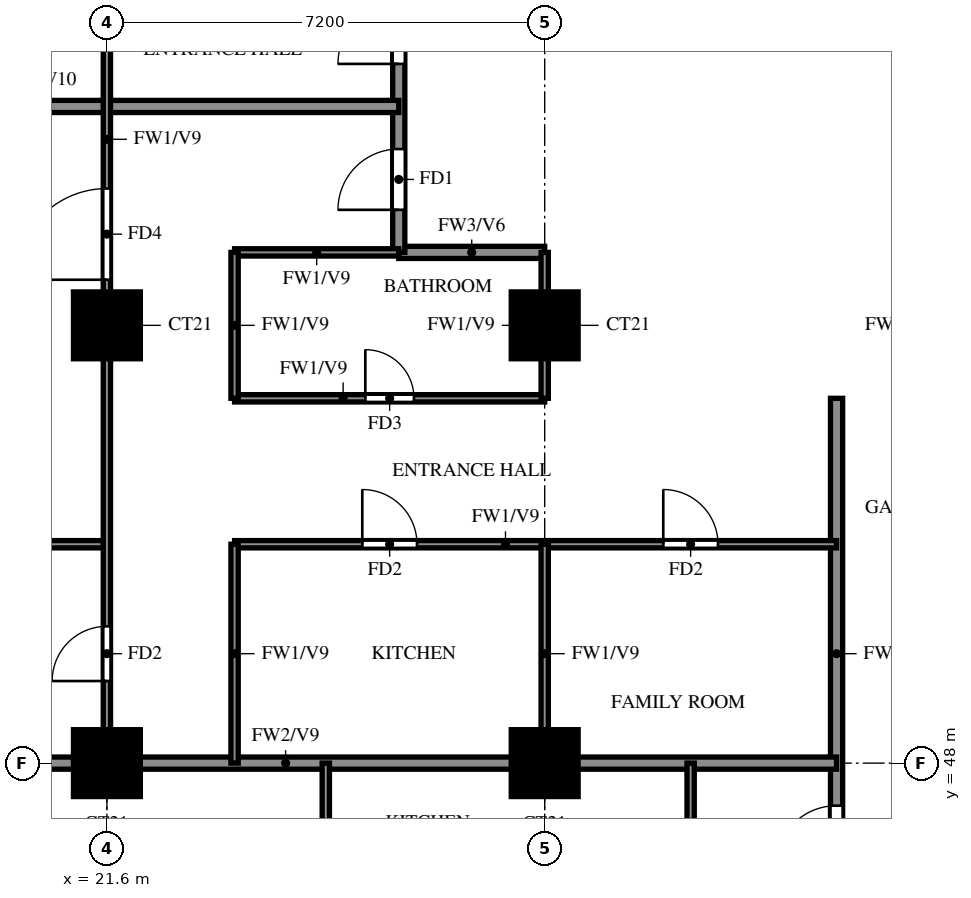
"""IFC4 building model, lengths in metres.
Left out: names, types, materials, properties, quantities, classifications, styles, units other than length and angle.
Written with IfcOpenShell. Run it as: python <this file> out.ifc"""

import sys

from ifc_helpers import new_model, si_unit, direction, frame, frame_2d, origin, origin_2d, place, context, subcontext, project, spatial, rectangle, extrude, source, transform, mapped, element, fill, save


model = new_model("IFC4")
c1 = context("Model", 3, precision=1e-05, world=origin(), true_north=direction((0.0, 1.0)))
c2 = subcontext(c1, "Body", "Model", "MODEL_VIEW")
j1 = project(units=[si_unit("LENGTHUNIT", "METRE"), si_unit("PLANEANGLEUNIT", "RADIAN")], contexts=[c1])
p1 = place(None, origin())
s1 = spatial("IfcSite", under=j1, at=p1, CompositionType="ELEMENT")
p2 = place(p1, origin())
s2 = spatial("IfcBuilding", under=s1, at=p2, CompositionType="ELEMENT")
p3 = place(p2, frame((0.0, 0.0, 134.0)))
s3 = spatial("IfcBuildingStorey", under=s2, at=p3, CompositionType="ELEMENT", Elevation=134.0)
m1 = source(origin(), c2, "Body", "SweptSolid", [
    extrude(rectangle(XDim=1.1, YDim=1.1, at=origin_2d()), origin(), (0.0, 0.0, 1.0), 3.15),
])
for number, where, z_axis, x_axis in (
    (1, (21.6, 48.0, 0.0), (0.0, 0.0, 1.0), (1.0, 0.0, 0.0)),
    (2, (28.8, 48.0, 0.0), (0.0, 0.0, 1.0), (1.0, 0.0, 0.0)),
    (3, (21.6, 55.2, 0.0), (0.0, 0.0, 1.0), (1.0, 0.0, 0.0)),
    (4, (28.8, 55.2, 0.0), (0.0, 0.0, 1.0), (1.0, 0.0, 0.0)),
):
    element("IfcColumn", number, at=place(p3, frame(where, z_axis=z_axis, x_axis=x_axis)), inside=s3, PredefinedType="COLUMN", context=c2, shape_type="MappedRepresentation", body=[
        mapped(m1, transform((0.0, 0.0, 0.0))),
    ])
p4 = place(p3, frame((26.4, 56.4, 0.0), z_axis=(0.0, 0.0, 1.0), x_axis=(1.0, 0.0, 0.0)))
e5 = element("IfcWall", 5, at=p4, inside=s3, PredefinedType="SOLIDWALL", context=c2, shape_type="SweptSolid", body=[
    extrude(rectangle(XDim=2.4, YDim=0.2, at=frame_2d((1.2, 0.0))), origin(), (0.0, 0.0, 1.0), 3.15),
])
p5 = place(p3, frame((26.4, 56.4, 0.0), z_axis=(0.0, 0.0, 1.0), x_axis=(0.0, 1.0, 0.0)))
e6 = element("IfcWall", 6, at=p5, inside=s3, PredefinedType="SOLIDWALL", context=c2, shape_type="SweptSolid", body=[
    extrude(rectangle(XDim=9.6, YDim=0.2, at=frame_2d((4.8, 0.0))), origin(), (0.0, 0.0, 1.0), 3.15),
])
p6 = place(p5, frame((0.7, 0.0, 0.0)))
e7 = element("IfcOpeningElement", 7, at=p6, cuts=e6, PredefinedType="OPENING", context=c2, shape_type="SweptSolid", body=[
    extrude(rectangle(XDim=1.0, YDim=2.1, at=frame_2d((0.5, 1.05))), frame((0.0, 0.11, 0.0), z_axis=(0.0, -1.0, 0.0), x_axis=(1.0, 0.0, 0.0)), (0.0, 0.0, 1.0), 0.22),
])
p7 = place(p5, frame((3.1, 0.0, 0.0)))
e8 = element("IfcOpeningElement", 8, at=p7, cuts=e6, PredefinedType="OPENING", context=c2, shape_type="SweptSolid", body=[
    extrude(rectangle(XDim=1.0, YDim=2.1, at=frame_2d((0.5, 1.05))), frame((0.0, 0.11, 0.0), z_axis=(0.0, -1.0, 0.0), x_axis=(1.0, 0.0, 0.0)), (0.0, 0.0, 1.0), 0.22),
])
p8 = place(p3, frame((33.6, 45.6, 0.0), z_axis=(0.0, 0.0, 1.0), x_axis=(0.0, 1.0, 0.0)))
e9 = element("IfcWall", 9, at=p8, inside=s3, PredefinedType="SOLIDWALL", context=c2, shape_type="SweptSolid", body=[
    extrude(rectangle(XDim=8.4, YDim=0.2, at=frame_2d((4.2, 0.0))), origin(), (0.0, 0.0, 1.0), 3.15),
])
p9 = place(p8, frame((0.7, 0.0, 0.0)))
e10 = element("IfcOpeningElement", 10, at=p9, cuts=e9, PredefinedType="OPENING", context=c2, shape_type="SweptSolid", body=[
    extrude(rectangle(XDim=1.0, YDim=2.1, at=frame_2d((0.5, 1.05))), frame((0.0, 0.11, 0.0), z_axis=(0.0, -1.0, 0.0), x_axis=(1.0, 0.0, 0.0)), (0.0, 0.0, 1.0), 0.22),
])
p10 = place(p3, frame((14.525, 48.0, 0.0), z_axis=(0.0, 0.0, 1.0), x_axis=(1.0, 0.0, 0.0)))
e11 = element("IfcWall", 11, at=p10, inside=s3, PredefinedType="SOLIDWALL", context=c2, shape_type="SweptSolid", body=[
    extrude(rectangle(XDim=19.075, YDim=0.2, at=frame_2d((9.538, 0.0))), origin(), (0.0, 0.0, 1.0), 3.15),
])
p11 = place(p3, frame((14.525, 58.8, 0.0), z_axis=(0.0, 0.0, 1.0), x_axis=(1.0, 0.0, 0.0)))
e12 = element("IfcWall", 12, at=p11, inside=s3, PredefinedType="SOLIDWALL", context=c2, shape_type="SweptSolid", body=[
    extrude(rectangle(XDim=11.875, YDim=0.2, at=frame_2d((5.938, 0.0))), origin(), (0.0, 0.0, 1.0), 2.25),
])
p12 = place(p3, frame((14.525, 51.6, 0.0), z_axis=(0.0, 0.0, 1.0), x_axis=(1.0, 0.0, 0.0)))
e13 = element("IfcWall", 13, at=p12, inside=s3, PredefinedType="PARTITIONING", context=c2, shape_type="SweptSolid", body=[
    extrude(rectangle(XDim=7.075, YDim=0.12, at=frame_2d((3.538, 0.0))), origin(), (0.0, 0.0, 1.0), 2.25),
])
p13 = place(p3, frame((23.7, 51.6, 0.0), z_axis=(0.0, 0.0, 1.0), x_axis=(1.0, 0.0, 0.0)))
e14 = element("IfcWall", 14, at=p13, inside=s3, PredefinedType="PARTITIONING", context=c2, shape_type="SweptSolid", body=[
    extrude(rectangle(XDim=9.9, YDim=0.12, at=frame_2d((4.95, 0.0))), origin(), (0.0, 0.0, 1.0), 3.15),
])
p14 = place(p13, frame((2.1, 0.0, 0.0)))
e15 = element("IfcOpeningElement", 15, at=p14, cuts=e14, PredefinedType="OPENING", context=c2, shape_type="SweptSolid", body=[
    extrude(rectangle(XDim=0.9, YDim=2.1, at=frame_2d((0.45, 1.05))), frame((0.0, 0.07, 0.0), z_axis=(0.0, -1.0, 0.0), x_axis=(1.0, 0.0, 0.0)), (0.0, 0.0, 1.0), 0.14),
])
p15 = place(p13, frame((7.05, 0.0, 0.0)))
e16 = element("IfcOpeningElement", 16, at=p15, cuts=e14, PredefinedType="OPENING", context=c2, shape_type="SweptSolid", body=[
    extrude(rectangle(XDim=0.9, YDim=2.1, at=frame_2d((0.45, 1.05))), frame((0.0, 0.07, 0.0), z_axis=(0.0, -1.0, 0.0), x_axis=(1.0, 0.0, 0.0)), (0.0, 0.0, 1.0), 0.14),
])
p16 = place(p3, frame((23.7, 54.0, 0.0), z_axis=(0.0, 0.0, 1.0), x_axis=(1.0, 0.0, 0.0)))
e17 = element("IfcWall", 17, at=p16, inside=s3, PredefinedType="PARTITIONING", context=c2, shape_type="SweptSolid", body=[
    extrude(rectangle(XDim=5.1, YDim=0.12, at=frame_2d((2.55, 0.0))), origin(), (0.0, 0.0, 1.0), 3.15),
])
p17 = place(p16, frame((2.15, 0.0, 0.0)))
e18 = element("IfcOpeningElement", 18, at=p17, cuts=e17, PredefinedType="OPENING", context=c2, shape_type="SweptSolid", body=[
    extrude(rectangle(XDim=0.8, YDim=2.1, at=frame_2d((0.4, 1.05))), frame((0.0, 0.07, 0.0), z_axis=(0.0, -1.0, 0.0), x_axis=(1.0, 0.0, 0.0)), (0.0, 0.0, 1.0), 0.14),
])
p18 = place(p3, frame((23.7, 56.4, 0.0), z_axis=(0.0, 0.0, 1.0), x_axis=(1.0, 0.0, 0.0)))
e19 = element("IfcWall", 19, at=p18, inside=s3, PredefinedType="PARTITIONING", context=c2, shape_type="SweptSolid", body=[
    extrude(rectangle(XDim=2.7, YDim=0.12, at=frame_2d((1.35, 0.0))), origin(), (0.0, 0.0, 1.0), 3.15),
])
p19 = place(p3, frame((21.6, 48.0, 0.0), z_axis=(0.0, 0.0, 1.0), x_axis=(0.0, 1.0, 0.0)))
e20 = element("IfcWall", 20, at=p19, inside=s3, PredefinedType="PARTITIONING", context=c2, shape_type="SweptSolid", body=[
    extrude(rectangle(XDim=21.6, YDim=0.12, at=frame_2d((10.8, 0.0))), origin(), (0.0, 0.0, 1.0), 3.15),
])
p20 = place(p19, frame((1.35, 0.0, 0.0)))
e21 = element("IfcOpeningElement", 21, at=p20, cuts=e20, PredefinedType="OPENING", context=c2, shape_type="SweptSolid", body=[
    extrude(rectangle(XDim=0.9, YDim=2.1, at=frame_2d((0.45, 1.05))), frame((0.0, 0.07, 0.0), z_axis=(0.0, -1.0, 0.0), x_axis=(1.0, 0.0, 0.0)), (0.0, 0.0, 1.0), 0.14),
])
p21 = place(p19, frame((7.95, 0.0, 0.0)))
e22 = element("IfcOpeningElement", 22, at=p21, cuts=e20, PredefinedType="OPENING", context=c2, shape_type="SweptSolid", body=[
    extrude(rectangle(XDim=1.5, YDim=2.1, at=frame_2d((0.75, 1.05))), frame((0.0, 0.07, 0.0), z_axis=(0.0, -1.0, 0.0), x_axis=(1.0, 0.0, 0.0)), (0.0, 0.0, 1.0), 0.14),
])
p22 = place(p19, frame((12.15, 0.0, 0.0)))
e23 = element("IfcOpeningElement", 23, at=p22, cuts=e20, PredefinedType="OPENING", context=c2, shape_type="SweptSolid", body=[
    extrude(rectangle(XDim=0.9, YDim=2.1, at=frame_2d((0.45, 1.05))), frame((0.0, 0.07, 0.0), z_axis=(0.0, -1.0, 0.0), x_axis=(1.0, 0.0, 0.0)), (0.0, 0.0, 1.0), 0.14),
])
p23 = place(p19, frame((17.55, 0.0, 0.0)))
e24 = element("IfcOpeningElement", 24, at=p23, cuts=e20, PredefinedType="OPENING", context=c2, shape_type="SweptSolid", body=[
    extrude(rectangle(XDim=0.9, YDim=2.1, at=frame_2d((0.45, 1.05))), frame((0.0, 0.07, 0.0), z_axis=(0.0, -1.0, 0.0), x_axis=(1.0, 0.0, 0.0)), (0.0, 0.0, 1.0), 0.14),
])
p24 = place(p3, frame((23.7, 48.0, 0.0), z_axis=(0.0, 0.0, 1.0), x_axis=(0.0, 1.0, 0.0)))
e25 = element("IfcWall", 25, at=p24, inside=s3, PredefinedType="PARTITIONING", context=c2, shape_type="SweptSolid", body=[
    extrude(rectangle(XDim=3.6, YDim=0.12, at=frame_2d((1.8, 0.0))), origin(), (0.0, 0.0, 1.0), 3.15),
])
p25 = place(p3, frame((23.7, 54.0, 0.0), z_axis=(0.0, 0.0, 1.0), x_axis=(0.0, 1.0, 0.0)))
e26 = element("IfcWall", 26, at=p25, inside=s3, PredefinedType="PARTITIONING", context=c2, shape_type="SweptSolid", body=[
    extrude(rectangle(XDim=2.4, YDim=0.12, at=frame_2d((1.2, 0.0))), origin(), (0.0, 0.0, 1.0), 3.15),
])
p26 = place(p3, frame((25.2, 39.725, 0.0), z_axis=(0.0, 0.0, 1.0), x_axis=(0.0, 1.0, 0.0)))
e27 = element("IfcWall", 27, at=p26, inside=s3, PredefinedType="PARTITIONING", context=c2, shape_type="SweptSolid", body=[
    extrude(rectangle(XDim=8.275, YDim=0.12, at=frame_2d((4.137, 0.0))), origin(), (0.0, 0.0, 1.0), 3.15),
])
p27 = place(p26, frame((4.525, 0.0, 0.0)))
e28 = element("IfcOpeningElement", 28, at=p27, cuts=e27, PredefinedType="OPENING", context=c2, shape_type="SweptSolid", body=[
    extrude(rectangle(XDim=0.9, YDim=2.1, at=frame_2d((0.45, 1.05))), frame((0.0, 0.07, 0.0), z_axis=(0.0, -1.0, 0.0), x_axis=(1.0, 0.0, 0.0)), (0.0, 0.0, 1.0), 0.14),
])
p28 = place(p3, frame((28.8, 48.0, 0.0), z_axis=(0.0, 0.0, 1.0), x_axis=(0.0, 1.0, 0.0)))
e29 = element("IfcWall", 29, at=p28, inside=s3, PredefinedType="PARTITIONING", context=c2, shape_type="SweptSolid", body=[
    extrude(rectangle(XDim=3.6, YDim=0.12, at=frame_2d((1.8, 0.0))), origin(), (0.0, 0.0, 1.0), 3.15),
])
for number, where, z_axis, x_axis in (
    (30, (28.8, 54.0, 0.0), (0.0, 0.0, 1.0), (0.0, 1.0, 0.0)),
    (31, (31.2, 45.6, 0.0), (0.0, 0.0, 1.0), (0.0, 1.0, 0.0)),
):
    element("IfcWall", number, at=place(p3, frame(where, z_axis=z_axis, x_axis=x_axis)), inside=s3, PredefinedType="PARTITIONING", context=c2, shape_type="SweptSolid", body=[
        extrude(rectangle(XDim=2.4, YDim=0.12, at=frame_2d((1.2, 0.0))), origin(), (0.0, 0.0, 1.0), 3.15),
    ])
p29 = place(p9, origin())
e32 = element("IfcDoor", 32, at=p29, inside=s3, OperationType="SINGLE_SWING_LEFT", PredefinedType="DOOR", context=c2, shape_type="SweptSolid", body=[
    extrude(rectangle(XDim=1.0, YDim=2.1, at=frame_2d((0.5, 1.05))), frame((0.0, 0.025, 0.0), z_axis=(0.0, -1.0, 0.0), x_axis=(1.0, 0.0, 0.0)), (0.0, 0.0, 1.0), 0.05),
])
fill(e10, e32)
p30 = place(p6, origin())
e33 = element("IfcDoor", 33, at=p30, inside=s3, OperationType="SINGLE_SWING_LEFT", PredefinedType="DOOR", context=c2, shape_type="SweptSolid", body=[
    extrude(rectangle(XDim=1.0, YDim=2.1, at=frame_2d((0.5, 1.05))), frame((0.0, 0.025, 0.0), z_axis=(0.0, -1.0, 0.0), x_axis=(1.0, 0.0, 0.0)), (0.0, 0.0, 1.0), 0.05),
])
fill(e7, e33)
p31 = place(p20, origin())
e34 = element("IfcDoor", 34, at=p31, inside=s3, OperationType="SINGLE_SWING_RIGHT", PredefinedType="DOOR", context=c2, shape_type="SweptSolid", body=[
    extrude(rectangle(XDim=0.9, YDim=2.1, at=frame_2d((0.45, 1.05))), frame((0.0, 0.025, 0.0), z_axis=(0.0, -1.0, 0.0), x_axis=(1.0, 0.0, 0.0)), (0.0, 0.0, 1.0), 0.05),
])
fill(e21, e34)
p32 = place(p21, origin())
e35 = element("IfcDoor", 35, at=p32, inside=s3, OperationType="SINGLE_SWING_RIGHT", PredefinedType="DOOR", context=c2, shape_type="SweptSolid", body=[
    extrude(rectangle(XDim=1.5, YDim=2.1, at=frame_2d((0.75, 1.05))), frame((0.0, 0.025, 0.0), z_axis=(0.0, -1.0, 0.0), x_axis=(1.0, 0.0, 0.0)), (0.0, 0.0, 1.0), 0.05),
])
fill(e22, e35)
p33 = place(p14, origin())
e36 = element("IfcDoor", 36, at=p33, inside=s3, OperationType="SINGLE_SWING_LEFT", PredefinedType="DOOR", context=c2, shape_type="SweptSolid", body=[
    extrude(rectangle(XDim=0.9, YDim=2.1, at=frame_2d((0.45, 1.05))), frame((0.0, 0.025, 0.0), z_axis=(0.0, -1.0, 0.0), x_axis=(1.0, 0.0, 0.0)), (0.0, 0.0, 1.0), 0.05),
])
fill(e15, e36)
p34 = place(p17, origin())
e37 = element("IfcDoor", 37, at=p34, inside=s3, OperationType="SINGLE_SWING_RIGHT", PredefinedType="DOOR", context=c2, shape_type="SweptSolid", body=[
    extrude(rectangle(XDim=0.8, YDim=2.1, at=frame_2d((0.4, 1.05))), frame((0.0, 0.025, 0.0), z_axis=(0.0, -1.0, 0.0), x_axis=(1.0, 0.0, 0.0)), (0.0, 0.0, 1.0), 0.05),
])
fill(e18, e37)
p35 = place(p15, origin())
e38 = element("IfcDoor", 38, at=p35, inside=s3, OperationType="SINGLE_SWING_LEFT", PredefinedType="DOOR", context=c2, shape_type="SweptSolid", body=[
    extrude(rectangle(XDim=0.9, YDim=2.1, at=frame_2d((0.45, 1.05))), frame((0.0, 0.025, 0.0), z_axis=(0.0, -1.0, 0.0), x_axis=(1.0, 0.0, 0.0)), (0.0, 0.0, 1.0), 0.05),
])
fill(e16, e38)
p36 = place(p7, origin())
e39 = element("IfcDoor", 39, at=p36, inside=s3, OperationType="SINGLE_SWING_LEFT", PredefinedType="DOOR", context=c2, shape_type="SweptSolid", body=[
    extrude(rectangle(XDim=1.0, YDim=2.1, at=frame_2d((0.5, 1.05))), frame((0.0, 0.025, 0.0), z_axis=(0.0, -1.0, 0.0), x_axis=(1.0, 0.0, 0.0)), (0.0, 0.0, 1.0), 0.05),
])
fill(e8, e39)
save(model, sys.argv[1])
